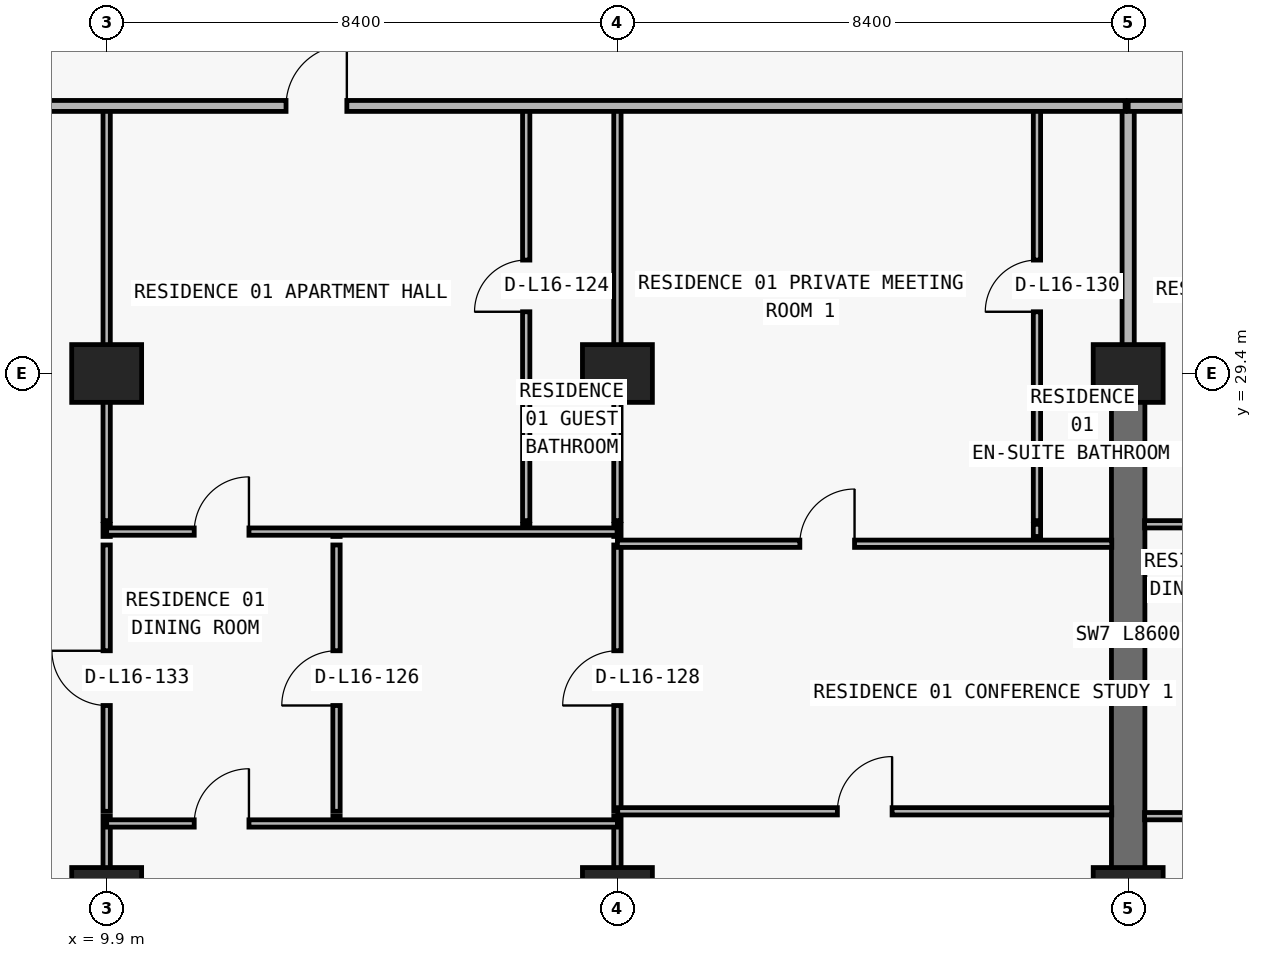
"""IFC4 building model, lengths in metres.
Left out: names, types, materials, properties, quantities, classifications, styles, units other than length and angle.
Written with IfcOpenShell. Run it as: python <this file> out.ifc"""

import sys

from ifc_helpers import new_model, si_unit, direction, frame, frame_2d, origin, origin_2d, place, context, subcontext, project, spatial, rectangle, extrude, element, fill, save


model = new_model("IFC4")
c1 = context("Model", 3, precision=1e-05, world=origin(), true_north=direction((0.0, 1.0)))
c2 = subcontext(c1, "Body", "Model", "MODEL_VIEW")
j1 = project(units=[si_unit("LENGTHUNIT", "METRE"), si_unit("PLANEANGLEUNIT", "RADIAN")], contexts=[c1])
p1 = place(None, origin())
s1 = spatial("IfcSite", under=j1, at=p1, CompositionType="ELEMENT")
p2 = place(p1, origin())
s2 = spatial("IfcBuilding", under=s1, at=p2, CompositionType="ELEMENT")
p3 = place(p2, frame((0.0, 0.0, 63.0)))
s3 = spatial("IfcBuildingStorey", under=s2, at=p3, CompositionType="ELEMENT", Elevation=63.0)
for number, where, z_axis, x_axis in (
    (1, (9.9, 20.8, 0.0), (0.0, 0.0, 1.0), (1.0, 0.0, 0.0)),
    (2, (18.3, 20.8, 0.0), (0.0, 0.0, 1.0), (1.0, 0.0, 0.0)),
    (3, (26.7, 20.8, 0.0), (0.0, 0.0, 1.0), (1.0, 0.0, 0.0)),
    (4, (9.9, 29.4, 0.0), (0.0, 0.0, 1.0), (1.0, 0.0, 0.0)),
    (5, (18.3, 29.4, 0.0), (0.0, 0.0, 1.0), (1.0, 0.0, 0.0)),
    (6, (26.7, 29.4, 0.0), (0.0, 0.0, 1.0), (1.0, 0.0, 0.0)),
):
    element("IfcColumn", number, at=place(p3, frame(where, z_axis=z_axis, x_axis=x_axis)), inside=s3, PredefinedType="COLUMN", context=c2, shape_type="SweptSolid", body=[
        extrude(rectangle(XDim=1.15, YDim=0.95, at=origin_2d()), origin(), (0.0, 0.0, 1.0), 3.05),
    ])
p4 = place(p3, frame((26.7, 20.8, 0.0), z_axis=(0.0, 0.0, 1.0), x_axis=(0.0, 1.0, 0.0)))
e7 = element("IfcWall", 7, at=p4, inside=s3, PredefinedType="SHEAR", context=c2, shape_type="SweptSolid", body=[
    extrude(rectangle(XDim=8.6, YDim=0.55, at=frame_2d((4.3, 0.0))), origin(), (0.0, 0.0, 1.0), 3.05),
])
p5 = place(p3, frame((9.9, 6.24, 0.0), z_axis=(0.0, 0.0, 1.0), x_axis=(0.0, 1.0, 0.0)))
e8 = element("IfcWall", 8, at=p5, inside=s3, PredefinedType="PARTITIONING", context=c2, shape_type="SweptSolid", body=[
    extrude(rectangle(XDim=15.88, YDim=0.12, at=frame_2d((7.94, 0.0))), origin(), (0.0, 0.0, 1.0), 2.11),
])
p6 = place(p3, frame((9.9, 22.2, 0.0), z_axis=(0.0, 0.0, 1.0), x_axis=(0.0, 1.0, 0.0)))
e9 = element("IfcWall", 9, at=p6, inside=s3, PredefinedType="PARTITIONING", context=c2, shape_type="SweptSolid", body=[
    extrude(rectangle(XDim=4.38, YDim=0.12, at=frame_2d((2.19, 0.0))), origin(), (0.0, 0.0, 1.0), 2.11),
])
p7 = place(p6, frame((1.74, 0.0, 0.0)))
e10 = element("IfcOpeningElement", 10, at=p7, cuts=e9, PredefinedType="OPENING", context=c2, shape_type="SweptSolid", body=[
    extrude(rectangle(XDim=0.9, YDim=2.06, at=frame_2d((0.45, 1.03))), frame((0.0, 0.07, 0.0), z_axis=(0.0, -1.0, 0.0), x_axis=(1.0, 0.0, 0.0)), (0.0, 0.0, 1.0), 0.14),
])
p8 = place(p3, frame((9.9, 26.72, 0.0), z_axis=(0.0, 0.0, 1.0), x_axis=(0.0, 1.0, 0.0)))
e11 = element("IfcWall", 11, at=p8, inside=s3, PredefinedType="PARTITIONING", context=c2, shape_type="SweptSolid", body=[
    extrude(rectangle(XDim=0.2, YDim=0.12, at=frame_2d((0.1, 0.0))), origin(), (0.0, 0.0, 1.0), 2.11),
])
p9 = place(p3, frame((9.9, 26.98, 0.0), z_axis=(0.0, 0.0, 1.0), x_axis=(0.0, 1.0, 0.0)))
e12 = element("IfcWall", 12, at=p9, inside=s3, PredefinedType="PARTITIONING", context=c2, shape_type="SweptSolid", body=[
    extrude(rectangle(XDim=6.82, YDim=0.12, at=frame_2d((3.41, 0.0))), origin(), (0.0, 0.0, 1.0), 2.11),
])
p10 = place(p3, frame((13.68, 22.0, 0.0), z_axis=(0.0, 0.0, 1.0), x_axis=(0.0, 1.0, 0.0)))
e13 = element("IfcWall", 13, at=p10, inside=s3, PredefinedType="PARTITIONING", context=c2, shape_type="SweptSolid", body=[
    extrude(rectangle(XDim=0.12, YDim=0.12, at=frame_2d((0.06, 0.0))), origin(), (0.0, 0.0, 1.0), 3.05),
])
p11 = place(p3, frame((13.68, 22.2, 0.0), z_axis=(0.0, 0.0, 1.0), x_axis=(0.0, 1.0, 0.0)))
e14 = element("IfcWall", 14, at=p11, inside=s3, PredefinedType="PARTITIONING", context=c2, shape_type="SweptSolid", body=[
    extrude(rectangle(XDim=4.38, YDim=0.12, at=frame_2d((2.19, 0.0))), origin(), (0.0, 0.0, 1.0), 3.05),
])
p12 = place(p11, frame((1.74, 0.0, 0.0)))
e15 = element("IfcOpeningElement", 15, at=p12, cuts=e14, PredefinedType="OPENING", context=c2, shape_type="SweptSolid", body=[
    extrude(rectangle(XDim=0.9, YDim=2.15, at=frame_2d((0.45, 1.075))), frame((0.0, 0.07, 0.0), z_axis=(0.0, -1.0, 0.0), x_axis=(1.0, 0.0, 0.0)), (0.0, 0.0, 1.0), 0.14),
])
p13 = place(p3, frame((13.68, 26.72, 0.0), z_axis=(0.0, 0.0, 1.0), x_axis=(0.0, 1.0, 0.0)))
e16 = element("IfcWall", 16, at=p13, inside=s3, PredefinedType="PARTITIONING", context=c2, shape_type="SweptSolid", body=[
    extrude(rectangle(XDim=0.08, YDim=0.12, at=frame_2d((0.04, 0.0))), origin(), (0.0, 0.0, 1.0), 3.05),
])
p14 = place(p3, frame((16.8, 26.8, 0.0), z_axis=(0.0, 0.0, 1.0), x_axis=(0.0, 1.0, 0.0)))
e17 = element("IfcWall", 17, at=p14, inside=s3, PredefinedType="PARTITIONING", context=c2, shape_type="SweptSolid", body=[
    extrude(rectangle(XDim=0.12, YDim=0.12, at=frame_2d((0.06, 0.0))), origin(), (0.0, 0.0, 1.0), 3.05),
])
p15 = place(p3, frame((16.8, 26.98, 0.0), z_axis=(0.0, 0.0, 1.0), x_axis=(0.0, 1.0, 0.0)))
e18 = element("IfcWall", 18, at=p15, inside=s3, PredefinedType="PARTITIONING", context=c2, shape_type="SweptSolid", body=[
    extrude(rectangle(XDim=6.82, YDim=0.12, at=frame_2d((3.41, 0.0))), origin(), (0.0, 0.0, 1.0), 3.05),
])
p16 = place(p15, frame((3.435, 0.0, 0.0)))
e19 = element("IfcOpeningElement", 19, at=p16, cuts=e18, PredefinedType="OPENING", context=c2, shape_type="SweptSolid", body=[
    extrude(rectangle(XDim=0.85, YDim=2.1, at=frame_2d((0.425, 1.05))), frame((0.0, 0.07, 0.0), z_axis=(0.0, -1.0, 0.0), x_axis=(1.0, 0.0, 0.0)), (0.0, 0.0, 1.0), 0.14),
])
p17 = place(p3, frame((18.3, 6.24, 0.0), z_axis=(0.0, 0.0, 1.0), x_axis=(0.0, 1.0, 0.0)))
e20 = element("IfcWall", 20, at=p17, inside=s3, PredefinedType="PARTITIONING", context=c2, shape_type="SweptSolid", body=[
    extrude(rectangle(XDim=15.88, YDim=0.12, at=frame_2d((7.94, 0.0))), origin(), (0.0, 0.0, 1.0), 2.11),
])
p18 = place(p3, frame((18.3, 22.2, 0.0), z_axis=(0.0, 0.0, 1.0), x_axis=(0.0, 1.0, 0.0)))
e21 = element("IfcWall", 21, at=p18, inside=s3, PredefinedType="PARTITIONING", context=c2, shape_type="SweptSolid", body=[
    extrude(rectangle(XDim=4.38, YDim=0.12, at=frame_2d((2.19, 0.0))), origin(), (0.0, 0.0, 1.0), 2.11),
])
p19 = place(p18, frame((1.74, 0.0, 0.0)))
e22 = element("IfcOpeningElement", 22, at=p19, cuts=e21, PredefinedType="OPENING", context=c2, shape_type="SweptSolid", body=[
    extrude(rectangle(XDim=0.9, YDim=2.06, at=frame_2d((0.45, 1.03))), frame((0.0, 0.07, 0.0), z_axis=(0.0, -1.0, 0.0), x_axis=(1.0, 0.0, 0.0)), (0.0, 0.0, 1.0), 0.14),
])
p20 = place(p3, frame((18.3, 26.72, 0.0), z_axis=(0.0, 0.0, 1.0), x_axis=(0.0, 1.0, 0.0)))
e23 = element("IfcWall", 23, at=p20, inside=s3, PredefinedType="PARTITIONING", context=c2, shape_type="SweptSolid", body=[
    extrude(rectangle(XDim=0.2, YDim=0.12, at=frame_2d((0.1, 0.0))), origin(), (0.0, 0.0, 1.0), 2.11),
])
p21 = place(p3, frame((18.3, 26.98, 0.0), z_axis=(0.0, 0.0, 1.0), x_axis=(0.0, 1.0, 0.0)))
e24 = element("IfcWall", 24, at=p21, inside=s3, PredefinedType="PARTITIONING", context=c2, shape_type="SweptSolid", body=[
    extrude(rectangle(XDim=6.82, YDim=0.12, at=frame_2d((3.41, 0.0))), origin(), (0.0, 0.0, 1.0), 2.11),
])
p22 = place(p3, frame((25.2, 26.72, 0.0), z_axis=(0.0, 0.0, 1.0), x_axis=(0.0, 1.0, 0.0)))
e25 = element("IfcWall", 25, at=p22, inside=s3, PredefinedType="PARTITIONING", context=c2, shape_type="SweptSolid", body=[
    extrude(rectangle(XDim=0.2, YDim=0.12, at=frame_2d((0.1, 0.0))), origin(), (0.0, 0.0, 1.0), 3.05),
])
p23 = place(p3, frame((25.2, 26.98, 0.0), z_axis=(0.0, 0.0, 1.0), x_axis=(0.0, 1.0, 0.0)))
e26 = element("IfcWall", 26, at=p23, inside=s3, PredefinedType="PARTITIONING", context=c2, shape_type="SweptSolid", body=[
    extrude(rectangle(XDim=6.82, YDim=0.12, at=frame_2d((3.41, 0.0))), origin(), (0.0, 0.0, 1.0), 3.05),
])
p24 = place(p23, frame((3.435, 0.0, 0.0)))
e27 = element("IfcOpeningElement", 27, at=p24, cuts=e26, PredefinedType="OPENING", context=c2, shape_type="SweptSolid", body=[
    extrude(rectangle(XDim=0.85, YDim=2.1, at=frame_2d((0.425, 1.05))), frame((0.0, 0.07, 0.0), z_axis=(0.0, -1.0, 0.0), x_axis=(1.0, 0.0, 0.0)), (0.0, 0.0, 1.0), 0.14),
])
p25 = place(p3, frame((26.7, 29.405, 0.0), z_axis=(0.0, 0.0, 1.0), x_axis=(0.0, 1.0, 0.0)))
e28 = element("IfcWall", 28, at=p25, inside=s3, PredefinedType="PARTITIONING", context=c2, shape_type="SweptSolid", body=[
    extrude(rectangle(XDim=4.395, YDim=0.2, at=frame_2d((2.198, 0.0))), origin(), (0.0, 0.0, 1.0), 2.335),
])
p26 = place(p3, frame((9.9, 22.0, 0.0), z_axis=(0.0, 0.0, 1.0), x_axis=(1.0, 0.0, 0.0)))
e29 = element("IfcWall", 29, at=p26, inside=s3, PredefinedType="PARTITIONING", context=c2, shape_type="SweptSolid", body=[
    extrude(rectangle(XDim=8.4, YDim=0.12, at=frame_2d((4.2, 0.0))), origin(), (0.0, 0.0, 1.0), 3.05),
])
p27 = place(p26, frame((1.44, 0.0, 0.0)))
e30 = element("IfcOpeningElement", 30, at=p27, cuts=e29, PredefinedType="OPENING", context=c2, shape_type="SweptSolid", body=[
    extrude(rectangle(XDim=0.9, YDim=2.15, at=frame_2d((0.45, 1.075))), frame((0.0, 0.07, 0.0), z_axis=(0.0, -1.0, 0.0), x_axis=(1.0, 0.0, 0.0)), (0.0, 0.0, 1.0), 0.14),
])
p28 = place(p3, frame((26.97, 22.12, 0.0), z_axis=(0.0, 0.0, 1.0), x_axis=(1.0, 0.0, 0.0)))
e31 = element("IfcWall", 31, at=p28, inside=s3, PredefinedType="PARTITIONING", context=c2, shape_type="SweptSolid", body=[
    extrude(rectangle(XDim=8.13, YDim=0.12, at=frame_2d((4.065, 0.0))), origin(), (0.0, 0.0, 1.0), 3.05),
])
p29 = place(p28, frame((1.179, 0.0, 0.0)))
e32 = element("IfcOpeningElement", 32, at=p29, cuts=e31, PredefinedType="OPENING", context=c2, shape_type="SweptSolid", body=[
    extrude(rectangle(XDim=0.9, YDim=2.15, at=frame_2d((0.45, 1.075))), frame((0.0, 0.07, 0.0), z_axis=(0.0, -1.0, 0.0), x_axis=(1.0, 0.0, 0.0)), (0.0, 0.0, 1.0), 0.14),
])
p30 = place(p3, frame((18.305, 22.2, 0.0), z_axis=(0.0, 0.0, 1.0), x_axis=(1.0, 0.0, 0.0)))
e33 = element("IfcWall", 33, at=p30, inside=s3, PredefinedType="PARTITIONING", context=c2, shape_type="SweptSolid", body=[
    extrude(rectangle(XDim=8.125, YDim=0.12, at=frame_2d((4.062, 0.0))), origin(), (0.0, 0.0, 1.0), 3.05),
])
p31 = place(p30, frame((3.613, 0.0, 0.0)))
e34 = element("IfcOpeningElement", 34, at=p31, cuts=e33, PredefinedType="OPENING", context=c2, shape_type="SweptSolid", body=[
    extrude(rectangle(XDim=0.9, YDim=2.15, at=frame_2d((0.45, 1.075))), frame((0.0, 0.07, 0.0), z_axis=(0.0, -1.0, 0.0), x_axis=(1.0, 0.0, 0.0)), (0.0, 0.0, 1.0), 0.14),
])
p32 = place(p3, frame((18.3, 26.6, 0.0), z_axis=(0.0, 0.0, 1.0), x_axis=(1.0, 0.0, 0.0)))
e35 = element("IfcWall", 35, at=p32, inside=s3, PredefinedType="PARTITIONING", context=c2, shape_type="SweptSolid", body=[
    extrude(rectangle(XDim=8.13, YDim=0.12, at=frame_2d((4.065, 0.0))), origin(), (0.0, 0.0, 1.0), 3.05),
])
p33 = place(p32, frame((3.0, 0.0, 0.0)))
e36 = element("IfcOpeningElement", 36, at=p33, cuts=e35, PredefinedType="OPENING", context=c2, shape_type="SweptSolid", body=[
    extrude(rectangle(XDim=0.9, YDim=2.15, at=frame_2d((0.45, 1.075))), frame((0.0, 0.07, 0.0), z_axis=(0.0, -1.0, 0.0), x_axis=(1.0, 0.0, 0.0)), (0.0, 0.0, 1.0), 0.14),
])
p34 = place(p3, frame((9.9, 26.8, 0.0), z_axis=(0.0, 0.0, 1.0), x_axis=(1.0, 0.0, 0.0)))
e37 = element("IfcWall", 37, at=p34, inside=s3, PredefinedType="PARTITIONING", context=c2, shape_type="SweptSolid", body=[
    extrude(rectangle(XDim=8.395, YDim=0.12, at=frame_2d((4.198, 0.0))), origin(), (0.0, 0.0, 1.0), 3.05),
])
p35 = place(p34, frame((1.44, 0.0, 0.0)))
e38 = element("IfcOpeningElement", 38, at=p35, cuts=e37, PredefinedType="OPENING", context=c2, shape_type="SweptSolid", body=[
    extrude(rectangle(XDim=0.9, YDim=2.15, at=frame_2d((0.45, 1.075))), frame((0.0, 0.07, 0.0), z_axis=(0.0, -1.0, 0.0), x_axis=(1.0, 0.0, 0.0)), (0.0, 0.0, 1.0), 0.14),
])
p36 = place(p3, frame((26.97, 26.92, 0.0), z_axis=(0.0, 0.0, 1.0), x_axis=(1.0, 0.0, 0.0)))
e39 = element("IfcWall", 39, at=p36, inside=s3, PredefinedType="PARTITIONING", context=c2, shape_type="SweptSolid", body=[
    extrude(rectangle(XDim=8.13, YDim=0.12, at=frame_2d((4.065, 0.0))), origin(), (0.0, 0.0, 1.0), 3.05),
])
p37 = place(p36, frame((1.179, 0.0, 0.0)))
e40 = element("IfcOpeningElement", 40, at=p37, cuts=e39, PredefinedType="OPENING", context=c2, shape_type="SweptSolid", body=[
    extrude(rectangle(XDim=0.9, YDim=2.15, at=frame_2d((0.45, 1.075))), frame((0.0, 0.07, 0.0), z_axis=(0.0, -1.0, 0.0), x_axis=(1.0, 0.0, 0.0)), (0.0, 0.0, 1.0), 0.14),
])
p38 = place(p3, frame((5.105, 33.8, 0.0), z_axis=(0.0, 0.0, 1.0), x_axis=(1.0, 0.0, 0.0)))
e41 = element("IfcWall", 41, at=p38, inside=s3, PredefinedType="PARTITIONING", context=c2, shape_type="SweptSolid", body=[
    extrude(rectangle(XDim=21.545, YDim=0.18, at=frame_2d((10.772, 0.0))), origin(), (0.0, 0.0, 1.0), 3.05),
])
p39 = place(p38, frame((7.745, 0.0, 0.0)))
e42 = element("IfcOpeningElement", 42, at=p39, cuts=e41, PredefinedType="OPENING", context=c2, shape_type="SweptSolid", body=[
    extrude(rectangle(XDim=1.0, YDim=2.2, at=frame_2d((0.5, 1.1))), frame((0.0, 0.1, 0.0), z_axis=(0.0, -1.0, 0.0), x_axis=(1.0, 0.0, 0.0)), (0.0, 0.0, 1.0), 0.2),
])
p40 = place(p3, frame((26.7, 33.8, 0.0), z_axis=(0.0, 0.0, 1.0), x_axis=(1.0, 0.0, 0.0)))
e43 = element("IfcWall", 43, at=p40, inside=s3, PredefinedType="PARTITIONING", context=c2, shape_type="SweptSolid", body=[
    extrude(rectangle(XDim=46.0, YDim=0.18, at=frame_2d((23.0, 0.0))), origin(), (0.0, 0.0, 1.0), 3.05),
])
p41 = place(p40, frame((2.95, 0.0, 0.0)))
e44 = element("IfcOpeningElement", 44, at=p41, cuts=e43, PredefinedType="OPENING", context=c2, shape_type="SweptSolid", body=[
    extrude(rectangle(XDim=1.0, YDim=2.2, at=frame_2d((0.5, 1.1))), frame((0.0, 0.1, 0.0), z_axis=(0.0, -1.0, 0.0), x_axis=(1.0, 0.0, 0.0)), (0.0, 0.0, 1.0), 0.2),
])
p42 = place(p40, frame((18.875, 0.0, 0.0)))
e45 = element("IfcOpeningElement", 45, at=p42, cuts=e43, PredefinedType="OPENING", context=c2, shape_type="SweptSolid", body=[
    extrude(rectangle(XDim=1.0, YDim=2.2, at=frame_2d((0.5, 1.1))), frame((0.0, 0.1, 0.0), z_axis=(0.0, -1.0, 0.0), x_axis=(1.0, 0.0, 0.0)), (0.0, 0.0, 1.0), 0.2),
])
p43 = place(p40, frame((27.275, 0.0, 0.0)))
e46 = element("IfcOpeningElement", 46, at=p43, cuts=e43, PredefinedType="OPENING", context=c2, shape_type="SweptSolid", body=[
    extrude(rectangle(XDim=1.0, YDim=2.2, at=frame_2d((0.5, 1.1))), frame((0.0, 0.1, 0.0), z_axis=(0.0, -1.0, 0.0), x_axis=(1.0, 0.0, 0.0)), (0.0, 0.0, 1.0), 0.2),
])
p44 = place(p40, frame((35.675, 0.0, 0.0)))
e47 = element("IfcOpeningElement", 47, at=p44, cuts=e43, PredefinedType="OPENING", context=c2, shape_type="SweptSolid", body=[
    extrude(rectangle(XDim=1.0, YDim=2.2, at=frame_2d((0.5, 1.1))), frame((0.0, 0.1, 0.0), z_axis=(0.0, -1.0, 0.0), x_axis=(1.0, 0.0, 0.0)), (0.0, 0.0, 1.0), 0.2),
])
p45 = place(p39, origin())
e48 = element("IfcDoor", 48, at=p45, inside=s3, OperationType="SINGLE_SWING_RIGHT", PredefinedType="DOOR", context=c2, shape_type="SweptSolid", body=[
    extrude(rectangle(XDim=1.0, YDim=2.2, at=frame_2d((0.5, 1.1))), frame((0.0, 0.025, 0.0), z_axis=(0.0, -1.0, 0.0), x_axis=(1.0, 0.0, 0.0)), (0.0, 0.0, 1.0), 0.05),
])
fill(e42, e48)
p46 = place(p16, origin())
e49 = element("IfcDoor", 49, at=p46, inside=s3, OperationType="SINGLE_SWING_LEFT", PredefinedType="DOOR", context=c2, shape_type="SweptSolid", body=[
    extrude(rectangle(XDim=0.85, YDim=2.1, at=frame_2d((0.425, 1.05))), frame((0.0, 0.025, 0.0), z_axis=(0.0, -1.0, 0.0), x_axis=(1.0, 0.0, 0.0)), (0.0, 0.0, 1.0), 0.05),
])
fill(e19, e49)
p47 = place(p35, origin())
e50 = element("IfcDoor", 50, at=p47, inside=s3, OperationType="SINGLE_SWING_RIGHT", PredefinedType="DOOR", context=c2, shape_type="SweptSolid", body=[
    extrude(rectangle(XDim=0.9, YDim=2.15, at=frame_2d((0.45, 1.075))), frame((0.0, 0.025, 0.0), z_axis=(0.0, -1.0, 0.0), x_axis=(1.0, 0.0, 0.0)), (0.0, 0.0, 1.0), 0.05),
])
fill(e38, e50)
p48 = place(p12, origin())
e51 = element("IfcDoor", 51, at=p48, inside=s3, OperationType="SINGLE_SWING_LEFT", PredefinedType="DOOR", context=c2, shape_type="SweptSolid", body=[
    extrude(rectangle(XDim=0.9, YDim=2.15, at=frame_2d((0.45, 1.075))), frame((0.0, 0.025, 0.0), z_axis=(0.0, -1.0, 0.0), x_axis=(1.0, 0.0, 0.0)), (0.0, 0.0, 1.0), 0.05),
])
fill(e15, e51)
p49 = place(p27, origin())
e52 = element("IfcDoor", 52, at=p49, inside=s3, OperationType="SINGLE_SWING_RIGHT", PredefinedType="DOOR", context=c2, shape_type="SweptSolid", body=[
    extrude(rectangle(XDim=0.9, YDim=2.15, at=frame_2d((0.45, 1.075))), frame((0.0, 0.025, 0.0), z_axis=(0.0, -1.0, 0.0), x_axis=(1.0, 0.0, 0.0)), (0.0, 0.0, 1.0), 0.05),
])
fill(e30, e52)
p50 = place(p19, origin())
e53 = element("IfcDoor", 53, at=p50, inside=s3, OperationType="SINGLE_SWING_LEFT", PredefinedType="DOOR", context=c2, shape_type="SweptSolid", body=[
    extrude(rectangle(XDim=0.9, YDim=2.06, at=frame_2d((0.45, 1.03))), frame((0.0, 0.025, 0.0), z_axis=(0.0, -1.0, 0.0), x_axis=(1.0, 0.0, 0.0)), (0.0, 0.0, 1.0), 0.05),
])
fill(e22, e53)
p51 = place(p33, origin())
e54 = element("IfcDoor", 54, at=p51, inside=s3, OperationType="SINGLE_SWING_RIGHT", PredefinedType="DOOR", context=c2, shape_type="SweptSolid", body=[
    extrude(rectangle(XDim=0.9, YDim=2.15, at=frame_2d((0.45, 1.075))), frame((0.0, 0.025, 0.0), z_axis=(0.0, -1.0, 0.0), x_axis=(1.0, 0.0, 0.0)), (0.0, 0.0, 1.0), 0.05),
])
fill(e36, e54)
p52 = place(p24, origin())
e55 = element("IfcDoor", 55, at=p52, inside=s3, OperationType="SINGLE_SWING_LEFT", PredefinedType="DOOR", context=c2, shape_type="SweptSolid", body=[
    extrude(rectangle(XDim=0.85, YDim=2.1, at=frame_2d((0.425, 1.05))), frame((0.0, 0.025, 0.0), z_axis=(0.0, -1.0, 0.0), x_axis=(1.0, 0.0, 0.0)), (0.0, 0.0, 1.0), 0.05),
])
fill(e27, e55)
p53 = place(p31, origin())
e56 = element("IfcDoor", 56, at=p53, inside=s3, OperationType="SINGLE_SWING_RIGHT", PredefinedType="DOOR", context=c2, shape_type="SweptSolid", body=[
    extrude(rectangle(XDim=0.9, YDim=2.15, at=frame_2d((0.45, 1.075))), frame((0.0, 0.025, 0.0), z_axis=(0.0, -1.0, 0.0), x_axis=(1.0, 0.0, 0.0)), (0.0, 0.0, 1.0), 0.05),
])
fill(e34, e56)
p54 = place(p7, origin())
e57 = element("IfcDoor", 57, at=p54, inside=s3, OperationType="SINGLE_SWING_RIGHT", PredefinedType="DOOR", context=c2, shape_type="SweptSolid", body=[
    extrude(rectangle(XDim=0.9, YDim=2.06, at=frame_2d((0.45, 1.03))), frame((0.0, 0.025, 0.0), z_axis=(0.0, -1.0, 0.0), x_axis=(1.0, 0.0, 0.0)), (0.0, 0.0, 1.0), 0.05),
])
fill(e10, e57)
save(model, sys.argv[1])
